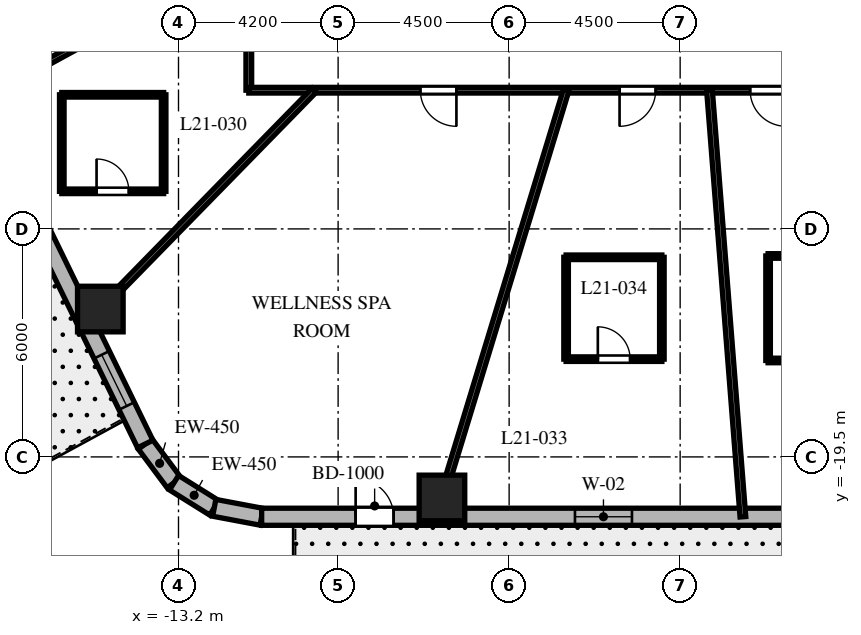
"""IFC4 building model, lengths in metres.
Left out: names, types, materials, properties, quantities, classifications, styles, units other than length and angle.
Written with IfcOpenShell. Run it as: python <this file> out.ifc"""

import sys

from ifc_helpers import new_model, si_unit, direction, frame, frame_2d, origin, origin_2d, place, context, subcontext, project, spatial, rectangle, extrude, element, fill, save


model = new_model("IFC4")
c1 = context("Model", 3, precision=1e-05, world=origin(), true_north=direction((0.0, 1.0)))
c2 = subcontext(c1, "Body", "Model", "MODEL_VIEW")
j1 = project(units=[si_unit("LENGTHUNIT", "METRE"), si_unit("PLANEANGLEUNIT", "RADIAN")], contexts=[c1])
p1 = place(None, origin())
s1 = spatial("IfcSite", under=j1, at=p1, CompositionType="ELEMENT")
p2 = place(p1, origin())
s2 = spatial("IfcBuilding", under=s1, at=p2, CompositionType="ELEMENT")
p3 = place(p2, frame((0.0, 0.0, 91.4)))
s3 = spatial("IfcBuildingStorey", under=s2, at=p3, CompositionType="ELEMENT", Elevation=91.4)
for number, where, z_axis, x_axis in (
    (1, (-6.268, -20.58, 0.0), (0.0, 0.0, 1.0), (1.0, 0.0, 0.0)),
    (2, (-15.257, -15.609, 0.0), (0.0, 0.0, 1.0), (1.0, 0.0, 0.0)),
):
    element("IfcColumn", number, at=place(p3, frame(where, z_axis=z_axis, x_axis=x_axis)), inside=s3, PredefinedType="COLUMN", context=c2, shape_type="SweptSolid", body=[
        extrude(rectangle(XDim=1.2, YDim=1.2, at=origin_2d()), origin(), (0.0, 0.0, 1.0), 3.7),
    ])
p4 = place(p3, frame((-14.076, -19.161, 0.0), z_axis=(0.0, 0.0, 1.0), x_axis=(0.597226657159, -0.802072515412, 0.0)))
e3 = element("IfcWall", 3, at=p4, inside=s3, PredefinedType="SOLIDWALL", context=c2, shape_type="SweptSolid", body=[
    extrude(rectangle(XDim=1.269, YDim=0.45, at=frame_2d((0.635, 0.0))), origin(), (0.0, 0.0, 1.0), 3.4),
])
p5 = place(p3, frame((-13.318, -20.179, 0.0), z_axis=(0.0, 0.0, 1.0), x_axis=(0.848031272749, -0.529946186362, 0.0)))
e4 = element("IfcWall", 4, at=p5, inside=s3, PredefinedType="SOLIDWALL", context=c2, shape_type="SweptSolid", body=[
    extrude(rectangle(XDim=1.248, YDim=0.45, at=frame_2d((0.624, 0.0))), origin(), (0.0, 0.0, 1.0), 3.4),
])
p6 = place(p3, frame((-12.259, -20.84, 0.0), z_axis=(0.0, 0.0, 1.0), x_axis=(0.982730354425, -0.185043374624, 0.0)))
e5 = element("IfcWall", 5, at=p6, inside=s3, PredefinedType="SOLIDWALL", context=c2, shape_type="SweptSolid", body=[
    extrude(rectangle(XDim=1.269, YDim=0.45, at=frame_2d((0.635, 0.0))), origin(), (0.0, 0.0, 1.0), 3.4),
])
p7 = place(p3, frame((-11.012, -21.075, 0.0), z_axis=(0.0, 0.0, 1.0), x_axis=(1.0, 0.0, 0.0)))
e6 = element("IfcWall", 6, at=p7, inside=s3, PredefinedType="SOLIDWALL", context=c2, shape_type="SweptSolid", body=[
    extrude(rectangle(XDim=23.782, YDim=0.45, at=frame_2d((11.891, 0.0))), origin(), (0.0, 0.0, 1.0), 3.4),
])
p8 = place(p7, frame((2.473, 0.0, 0.0)))
e7 = element("IfcOpeningElement", 7, at=p8, cuts=e6, PredefinedType="OPENING", context=c2, shape_type="SweptSolid", body=[
    extrude(rectangle(XDim=1.0, YDim=2.15, at=frame_2d((0.5, 1.075))), frame((0.0, 0.235, 0.0), z_axis=(0.0, -1.0, 0.0), x_axis=(1.0, 0.0, 0.0)), (0.0, 0.0, 1.0), 0.47),
])
p9 = place(p7, frame((8.244, 0.0, 0.8)))
e8 = element("IfcOpeningElement", 8, at=p9, cuts=e6, PredefinedType="OPENING", context=c2, shape_type="SweptSolid", body=[
    extrude(rectangle(XDim=1.5, YDim=1.8, at=frame_2d((0.75, 0.9))), frame((0.0, 0.235, 0.0), z_axis=(0.0, -1.0, 0.0), x_axis=(1.0, 0.0, 0.0)), (0.0, 0.0, 1.0), 0.47),
])
p10 = place(p7, frame((14.811, 0.0, 0.8)))
e9 = element("IfcOpeningElement", 9, at=p10, cuts=e6, PredefinedType="OPENING", context=c2, shape_type="SweptSolid", body=[
    extrude(rectangle(XDim=1.5, YDim=1.8, at=frame_2d((0.75, 0.9))), frame((0.0, 0.235, 0.0), z_axis=(0.0, -1.0, 0.0), x_axis=(1.0, 0.0, 0.0)), (0.0, 0.0, 1.0), 0.47),
])
p11 = place(p7, frame((20.741, 0.0, 0.8)))
e10 = element("IfcOpeningElement", 10, at=p11, cuts=e6, PredefinedType="OPENING", context=c2, shape_type="SweptSolid", body=[
    extrude(rectangle(XDim=1.5, YDim=1.8, at=frame_2d((0.75, 0.9))), frame((0.0, 0.235, 0.0), z_axis=(0.0, -1.0, 0.0), x_axis=(1.0, 0.0, 0.0)), (0.0, 0.0, 1.0), 0.47),
])
p12 = place(p3, frame((-22.238, -2.427, 0.0), z_axis=(0.0, 0.0, 1.0), x_axis=(0.438374803278, -0.898792262901, 0.0)))
e11 = element("IfcWall", 11, at=p12, inside=s3, PredefinedType="SOLIDWALL", context=c2, shape_type="SweptSolid", body=[
    extrude(rectangle(XDim=18.618, YDim=0.45, at=frame_2d((9.309, 0.0))), origin(), (0.0, 0.0, 1.0), 3.4),
])
p13 = place(p12, frame((4.62, 0.0, 0.0)))
e12 = element("IfcOpeningElement", 12, at=p13, cuts=e11, PredefinedType="OPENING", context=c2, shape_type="SweptSolid", body=[
    extrude(rectangle(XDim=0.95, YDim=2.15, at=frame_2d((0.475, 1.075))), frame((0.0, 0.235, 0.0), z_axis=(0.0, -1.0, 0.0), x_axis=(1.0, 0.0, 0.0)), (0.0, 0.0, 1.0), 0.47),
])
p14 = place(p12, frame((1.163, 0.0, 0.8)))
e13 = element("IfcOpeningElement", 13, at=p14, cuts=e11, PredefinedType="OPENING", context=c2, shape_type="SweptSolid", body=[
    extrude(rectangle(XDim=1.5, YDim=1.8, at=frame_2d((0.75, 0.9))), frame((0.0, 0.235, 0.0), z_axis=(0.0, -1.0, 0.0), x_axis=(1.0, 0.0, 0.0)), (0.0, 0.0, 1.0), 0.47),
])
p15 = place(p12, frame((6.291, 0.0, 0.8)))
e14 = element("IfcOpeningElement", 14, at=p15, cuts=e11, PredefinedType="OPENING", context=c2, shape_type="SweptSolid", body=[
    extrude(rectangle(XDim=1.5, YDim=1.8, at=frame_2d((0.75, 0.9))), frame((0.0, 0.235, 0.0), z_axis=(0.0, -1.0, 0.0), x_axis=(1.0, 0.0, 0.0)), (0.0, 0.0, 1.0), 0.47),
])
p16 = place(p12, frame((10.831, 0.0, 0.8)))
e15 = element("IfcOpeningElement", 15, at=p16, cuts=e11, PredefinedType="OPENING", context=c2, shape_type="SweptSolid", body=[
    extrude(rectangle(XDim=1.5, YDim=1.8, at=frame_2d((0.75, 0.9))), frame((0.0, 0.235, 0.0), z_axis=(0.0, -1.0, 0.0), x_axis=(1.0, 0.0, 0.0)), (0.0, 0.0, 1.0), 0.47),
])
p17 = place(p12, frame((16.006, 0.0, 0.8)))
e16 = element("IfcOpeningElement", 16, at=p17, cuts=e11, PredefinedType="OPENING", context=c2, shape_type="SweptSolid", body=[
    extrude(rectangle(XDim=1.5, YDim=1.8, at=frame_2d((0.75, 0.9))), frame((0.0, 0.235, 0.0), z_axis=(0.0, -1.0, 0.0), x_axis=(1.0, 0.0, 0.0)), (0.0, 0.0, 1.0), 0.47),
])
p18 = place(p3, frame((-11.35, -9.85, 0.0), z_axis=(0.0, 0.0, 1.0), x_axis=(0.0, 1.0, 0.0)))
e17 = element("IfcWall", 17, at=p18, inside=s3, PredefinedType="PARTITIONING", context=c2, shape_type="SweptSolid", body=[
    extrude(rectangle(XDim=19.7, YDim=0.15, at=frame_2d((9.85, 0.0))), origin(), (0.0, 0.0, 1.0), 2.84),
])
p19 = place(p18, frame((15.205, 0.0, 0.0)))
e18 = element("IfcOpeningElement", 18, at=p19, cuts=e17, PredefinedType="OPENING", context=c2, shape_type="SweptSolid", body=[
    extrude(rectangle(XDim=0.95, YDim=2.03, at=frame_2d((0.475, 1.015))), frame((0.0, 0.085, 0.0), z_axis=(0.0, -1.0, 0.0), x_axis=(1.0, 0.0, 0.0)), (0.0, 0.0, 1.0), 0.17),
])
p20 = place(p18, frame((8.836, 0.0, 0.0)))
e19 = element("IfcOpeningElement", 19, at=p20, cuts=e17, PredefinedType="OPENING", context=c2, shape_type="SweptSolid", body=[
    extrude(rectangle(XDim=0.95, YDim=2.03, at=frame_2d((0.475, 1.015))), frame((0.0, 0.085, 0.0), z_axis=(0.0, -1.0, 0.0), x_axis=(1.0, 0.0, 0.0)), (0.0, 0.0, 1.0), 0.17),
])
p21 = place(p18, frame((4.714, 0.0, 0.0)))
e20 = element("IfcOpeningElement", 20, at=p21, cuts=e17, PredefinedType="OPENING", context=c2, shape_type="SweptSolid", body=[
    extrude(rectangle(XDim=0.9, YDim=2.03, at=frame_2d((0.45, 1.015))), frame((0.0, 0.085, 0.0), z_axis=(0.0, -1.0, 0.0), x_axis=(1.0, 0.0, 0.0)), (0.0, 0.0, 1.0), 0.17),
])
p22 = place(p18, frame((1.462, 0.0, 0.0)))
e21 = element("IfcOpeningElement", 21, at=p22, cuts=e17, PredefinedType="OPENING", context=c2, shape_type="SweptSolid", body=[
    extrude(rectangle(XDim=0.95, YDim=2.03, at=frame_2d((0.475, 1.015))), frame((0.0, 0.085, 0.0), z_axis=(0.0, -1.0, 0.0), x_axis=(1.0, 0.0, 0.0)), (0.0, 0.0, 1.0), 0.17),
])
p23 = place(p3, frame((11.35, -9.85, 0.0), z_axis=(0.0, 0.0, 1.0), x_axis=(-1.0, 0.0, 0.0)))
e22 = element("IfcWall", 22, at=p23, inside=s3, PredefinedType="PARTITIONING", context=c2, shape_type="SweptSolid", body=[
    extrude(rectangle(XDim=22.7, YDim=0.15, at=frame_2d((11.35, 0.0))), origin(), (0.0, 0.0, 1.0), 2.84),
])
p24 = place(p23, frame((17.237, 0.0, 0.0)))
e23 = element("IfcOpeningElement", 23, at=p24, cuts=e22, PredefinedType="OPENING", context=c2, shape_type="SweptSolid", body=[
    extrude(rectangle(XDim=0.95, YDim=2.03, at=frame_2d((0.475, 1.015))), frame((0.0, 0.085, 0.0), z_axis=(0.0, -1.0, 0.0), x_axis=(1.0, 0.0, 0.0)), (0.0, 0.0, 1.0), 0.17),
])
p25 = place(p23, frame((11.994, 0.0, 0.0)))
e24 = element("IfcOpeningElement", 24, at=p25, cuts=e22, PredefinedType="OPENING", context=c2, shape_type="SweptSolid", body=[
    extrude(rectangle(XDim=0.95, YDim=2.03, at=frame_2d((0.475, 1.015))), frame((0.0, 0.085, 0.0), z_axis=(0.0, -1.0, 0.0), x_axis=(1.0, 0.0, 0.0)), (0.0, 0.0, 1.0), 0.17),
])
p26 = place(p23, frame((8.559, 0.0, 0.0)))
e25 = element("IfcOpeningElement", 25, at=p26, cuts=e22, PredefinedType="OPENING", context=c2, shape_type="SweptSolid", body=[
    extrude(rectangle(XDim=0.95, YDim=2.03, at=frame_2d((0.475, 1.015))), frame((0.0, 0.085, 0.0), z_axis=(0.0, -1.0, 0.0), x_axis=(1.0, 0.0, 0.0)), (0.0, 0.0, 1.0), 0.17),
])
p27 = place(p23, frame((5.728, 0.0, 0.0)))
e26 = element("IfcOpeningElement", 26, at=p27, cuts=e22, PredefinedType="OPENING", context=c2, shape_type="SweptSolid", body=[
    extrude(rectangle(XDim=0.9, YDim=2.03, at=frame_2d((0.45, 1.015))), frame((0.0, 0.085, 0.0), z_axis=(0.0, -1.0, 0.0), x_axis=(1.0, 0.0, 0.0)), (0.0, 0.0, 1.0), 0.17),
])
p28 = place(p23, frame((2.093, 0.0, 0.0)))
e27 = element("IfcOpeningElement", 27, at=p28, cuts=e22, PredefinedType="OPENING", context=c2, shape_type="SweptSolid", body=[
    extrude(rectangle(XDim=0.95, YDim=2.03, at=frame_2d((0.475, 1.015))), frame((0.0, 0.085, 0.0), z_axis=(0.0, -1.0, 0.0), x_axis=(1.0, 0.0, 0.0)), (0.0, 0.0, 1.0), 0.17),
])
p29 = place(p3, frame((-11.35, -6.215, 0.0), z_axis=(0.0, 0.0, 1.0), x_axis=(-0.877115535756, -0.480279436303, 0.0)))
e28 = element("IfcWall", 28, at=p29, inside=s3, PredefinedType="PARTITIONING", context=c2, shape_type="SweptSolid", body=[
    extrude(rectangle(XDim=8.134, YDim=0.15, at=frame_2d((4.067, 0.0))), origin(), (0.0, 0.0, 1.0), 2.54),
])
p30 = place(p3, frame((-9.628, -9.85, 0.0), z_axis=(0.0, 0.0, 1.0), x_axis=(-0.698992824326, -0.715128681805, 0.0)))
e29 = element("IfcWall", 29, at=p30, inside=s3, PredefinedType="PARTITIONING", context=c2, shape_type="SweptSolid", body=[
    extrude(rectangle(XDim=8.579, YDim=0.15, at=frame_2d((4.29, 0.0))), origin(), (0.0, 0.0, 1.0), 2.54),
])
p31 = place(p3, frame((-3.0, -9.85, 0.0), z_axis=(0.0, 0.0, 1.0), x_axis=(-0.291352035382, -0.95661590593, 0.0)))
e30 = element("IfcWall", 30, at=p31, inside=s3, PredefinedType="PARTITIONING", context=c2, shape_type="SweptSolid", body=[
    extrude(rectangle(XDim=11.734, YDim=0.15, at=frame_2d((5.867, 0.0))), origin(), (0.0, 0.0, 1.0), 2.54),
])
p32 = place(p3, frame((0.772, -9.85, 0.0), z_axis=(0.0, 0.0, 1.0), x_axis=(0.078125747145, -0.996943512759, 0.0)))
e31 = element("IfcWall", 31, at=p32, inside=s3, PredefinedType="PARTITIONING", context=c2, shape_type="SweptSolid", body=[
    extrude(rectangle(XDim=11.259, YDim=0.15, at=frame_2d((5.63, 0.0))), origin(), (0.0, 0.0, 1.0), 2.54),
])
p33 = place(p3, frame((-16.271, -12.511, 0.0), z_axis=(0.0, 0.0, 1.0), x_axis=(1.0, 0.0, 0.0)))
e32 = element("IfcWall", 32, at=p33, inside=s3, PredefinedType="PARTITIONING", context=c2, shape_type="SweptSolid", body=[
    extrude(rectangle(XDim=2.68, YDim=0.12, at=frame_2d((1.34, 0.0))), origin(), (0.0, 0.0, 1.0), 3.4),
])
p34 = place(p33, frame((0.915, 0.0, 0.0)))
e33 = element("IfcOpeningElement", 33, at=p34, cuts=e32, PredefinedType="OPENING", context=c2, shape_type="SweptSolid", body=[
    extrude(rectangle(XDim=0.85, YDim=2.03, at=frame_2d((0.425, 1.015))), frame((0.0, 0.07, 0.0), z_axis=(0.0, -1.0, 0.0), x_axis=(1.0, 0.0, 0.0)), (0.0, 0.0, 1.0), 0.14),
])
p35 = place(p3, frame((-13.591, -12.511, 0.0), z_axis=(0.0, 0.0, 1.0), x_axis=(0.0, 1.0, 0.0)))
e34 = element("IfcWall", 34, at=p35, inside=s3, PredefinedType="PARTITIONING", context=c2, shape_type="SweptSolid", body=[
    extrude(rectangle(XDim=2.54, YDim=0.12, at=frame_2d((1.27, 0.0))), origin(), (0.0, 0.0, 1.0), 2.927),
])
p36 = place(p3, frame((-13.591, -9.971, 0.0), z_axis=(0.0, 0.0, 1.0), x_axis=(-1.0, 0.0, 0.0)))
e35 = element("IfcWall", 35, at=p36, inside=s3, PredefinedType="PARTITIONING", context=c2, shape_type="SweptSolid", body=[
    extrude(rectangle(XDim=2.68, YDim=0.12, at=frame_2d((1.34, 0.0))), origin(), (0.0, 0.0, 1.0), 2.927),
])
p37 = place(p3, frame((-16.271, -9.971, 0.0), z_axis=(0.0, 0.0, 1.0), x_axis=(0.0, -1.0, 0.0)))
e36 = element("IfcWall", 36, at=p37, inside=s3, PredefinedType="PARTITIONING", context=c2, shape_type="SweptSolid", body=[
    extrude(rectangle(XDim=2.54, YDim=0.12, at=frame_2d((1.27, 0.0))), origin(), (0.0, 0.0, 1.0), 3.4),
])
p38 = place(p3, frame((-3.001, -16.927, 0.0), z_axis=(0.0, 0.0, 1.0), x_axis=(1.0, 0.0, 0.0)))
e37 = element("IfcWall", 37, at=p38, inside=s3, PredefinedType="PARTITIONING", context=c2, shape_type="SweptSolid", body=[
    extrude(rectangle(XDim=2.52, YDim=0.12, at=frame_2d((1.26, 0.0))), origin(), (0.0, 0.0, 1.0), 3.4),
])
p39 = place(p38, frame((0.835, 0.0, 0.0)))
e38 = element("IfcOpeningElement", 38, at=p39, cuts=e37, PredefinedType="OPENING", context=c2, shape_type="SweptSolid", body=[
    extrude(rectangle(XDim=0.85, YDim=2.03, at=frame_2d((0.425, 1.015))), frame((0.0, 0.07, 0.0), z_axis=(0.0, -1.0, 0.0), x_axis=(1.0, 0.0, 0.0)), (0.0, 0.0, 1.0), 0.14),
])
p40 = place(p3, frame((-0.481, -16.927, 0.0), z_axis=(0.0, 0.0, 1.0), x_axis=(0.0, 1.0, 0.0)))
e39 = element("IfcWall", 39, at=p40, inside=s3, PredefinedType="PARTITIONING", context=c2, shape_type="SweptSolid", body=[
    extrude(rectangle(XDim=2.68, YDim=0.12, at=frame_2d((1.34, 0.0))), origin(), (0.0, 0.0, 1.0), 2.841),
])
p41 = place(p3, frame((-0.481, -14.247, 0.0), z_axis=(0.0, 0.0, 1.0), x_axis=(-1.0, 0.0, 0.0)))
e40 = element("IfcWall", 40, at=p41, inside=s3, PredefinedType="PARTITIONING", context=c2, shape_type="SweptSolid", body=[
    extrude(rectangle(XDim=2.52, YDim=0.12, at=frame_2d((1.26, 0.0))), origin(), (0.0, 0.0, 1.0), 3.4),
])
p42 = place(p3, frame((-3.001, -14.247, 0.0), z_axis=(0.0, 0.0, 1.0), x_axis=(0.0, -1.0, 0.0)))
e41 = element("IfcWall", 41, at=p42, inside=s3, PredefinedType="PARTITIONING", context=c2, shape_type="SweptSolid", body=[
    extrude(rectangle(XDim=2.68, YDim=0.12, at=frame_2d((1.34, 0.0))), origin(), (0.0, 0.0, 1.0), 2.841),
])
p43 = place(p3, frame((2.314, -16.962, 0.0), z_axis=(0.0, 0.0, 1.0), x_axis=(1.0, 0.0, 0.0)))
e42 = element("IfcWall", 42, at=p43, inside=s3, PredefinedType="PARTITIONING", context=c2, shape_type="SweptSolid", body=[
    extrude(rectangle(XDim=2.6, YDim=0.12, at=frame_2d((1.3, 0.0))), origin(), (0.0, 0.0, 1.0), 3.4),
])
p44 = place(p43, frame((0.875, 0.0, 0.0)))
e43 = element("IfcOpeningElement", 43, at=p44, cuts=e42, PredefinedType="OPENING", context=c2, shape_type="SweptSolid", body=[
    extrude(rectangle(XDim=0.85, YDim=2.03, at=frame_2d((0.425, 1.015))), frame((0.0, 0.07, 0.0), z_axis=(0.0, -1.0, 0.0), x_axis=(1.0, 0.0, 0.0)), (0.0, 0.0, 1.0), 0.14),
])
p45 = place(p3, frame((4.914, -14.212, 0.0), z_axis=(0.0, 0.0, 1.0), x_axis=(-1.0, 0.0, 0.0)))
e44 = element("IfcWall", 44, at=p45, inside=s3, PredefinedType="PARTITIONING", context=c2, shape_type="SweptSolid", body=[
    extrude(rectangle(XDim=2.6, YDim=0.12, at=frame_2d((1.3, 0.0))), origin(), (0.0, 0.0, 1.0), 3.4),
])
p46 = place(p3, frame((2.314, -14.212, 0.0), z_axis=(0.0, 0.0, 1.0), x_axis=(0.0, -1.0, 0.0)))
e45 = element("IfcWall", 45, at=p46, inside=s3, PredefinedType="PARTITIONING", context=c2, shape_type="SweptSolid", body=[
    extrude(rectangle(XDim=2.75, YDim=0.12, at=frame_2d((1.375, 0.0))), origin(), (0.0, 0.0, 1.0), 2.841),
])
p47 = place(p8, origin())
e46 = element("IfcDoor", 46, at=p47, inside=s3, OperationType="SINGLE_SWING_LEFT", PredefinedType="DOOR", context=c2, shape_type="SweptSolid", body=[
    extrude(rectangle(XDim=1.0, YDim=2.15, at=frame_2d((0.5, 1.075))), frame((0.0, 0.025, 0.0), z_axis=(0.0, -1.0, 0.0), x_axis=(1.0, 0.0, 0.0)), (0.0, 0.0, 1.0), 0.05),
])
fill(e7, e46)
p48 = place(p9, origin())
e47 = element("IfcWindow", 47, at=p48, inside=s3, PartitioningType="SINGLE_PANEL", PredefinedType="WINDOW", context=c2, shape_type="SweptSolid", body=[
    extrude(rectangle(XDim=1.5, YDim=1.8, at=frame_2d((0.75, 0.9))), frame((0.0, 0.03, 0.0), z_axis=(0.0, -1.0, 0.0), x_axis=(1.0, 0.0, 0.0)), (0.0, 0.0, 1.0), 0.06),
])
fill(e8, e47)
p49 = place(p17, origin())
e48 = element("IfcWindow", 48, at=p49, inside=s3, PartitioningType="SINGLE_PANEL", PredefinedType="WINDOW", context=c2, shape_type="SweptSolid", body=[
    extrude(rectangle(XDim=1.5, YDim=1.8, at=frame_2d((0.75, 0.9))), frame((0.0, 0.03, 0.0), z_axis=(0.0, -1.0, 0.0), x_axis=(1.0, 0.0, 0.0)), (0.0, 0.0, 1.0), 0.06),
])
fill(e16, e48)
p50 = place(p34, origin())
e49 = element("IfcDoor", 49, at=p50, inside=s3, OperationType="SINGLE_SWING_LEFT", PredefinedType="DOOR", context=c2, shape_type="SweptSolid", body=[
    extrude(rectangle(XDim=0.85, YDim=2.03, at=frame_2d((0.425, 1.015))), frame((0.0, 0.025, 0.0), z_axis=(0.0, -1.0, 0.0), x_axis=(1.0, 0.0, 0.0)), (0.0, 0.0, 1.0), 0.05),
])
fill(e33, e49)
p51 = place(p24, origin())
e50 = element("IfcDoor", 50, at=p51, inside=s3, OperationType="SINGLE_SWING_LEFT", PredefinedType="DOOR", context=c2, shape_type="SweptSolid", body=[
    extrude(rectangle(XDim=0.95, YDim=2.03, at=frame_2d((0.475, 1.015))), frame((0.0, 0.025, 0.0), z_axis=(0.0, -1.0, 0.0), x_axis=(1.0, 0.0, 0.0)), (0.0, 0.0, 1.0), 0.05),
])
fill(e23, e50)
p52 = place(p25, origin())
e51 = element("IfcDoor", 51, at=p52, inside=s3, OperationType="SINGLE_SWING_RIGHT", PredefinedType="DOOR", context=c2, shape_type="SweptSolid", body=[
    extrude(rectangle(XDim=0.95, YDim=2.03, at=frame_2d((0.475, 1.015))), frame((0.0, 0.025, 0.0), z_axis=(0.0, -1.0, 0.0), x_axis=(1.0, 0.0, 0.0)), (0.0, 0.0, 1.0), 0.05),
])
fill(e24, e51)
p53 = place(p39, origin())
e52 = element("IfcDoor", 52, at=p53, inside=s3, OperationType="SINGLE_SWING_LEFT", PredefinedType="DOOR", context=c2, shape_type="SweptSolid", body=[
    extrude(rectangle(XDim=0.85, YDim=2.03, at=frame_2d((0.425, 1.015))), frame((0.0, 0.025, 0.0), z_axis=(0.0, -1.0, 0.0), x_axis=(1.0, 0.0, 0.0)), (0.0, 0.0, 1.0), 0.05),
])
fill(e38, e52)
p54 = place(p26, origin())
e53 = element("IfcDoor", 53, at=p54, inside=s3, OperationType="SINGLE_SWING_LEFT", PredefinedType="DOOR", context=c2, shape_type="SweptSolid", body=[
    extrude(rectangle(XDim=0.95, YDim=2.03, at=frame_2d((0.475, 1.015))), frame((0.0, 0.025, 0.0), z_axis=(0.0, -1.0, 0.0), x_axis=(1.0, 0.0, 0.0)), (0.0, 0.0, 1.0), 0.05),
])
fill(e25, e53)
save(model, sys.argv[1])
